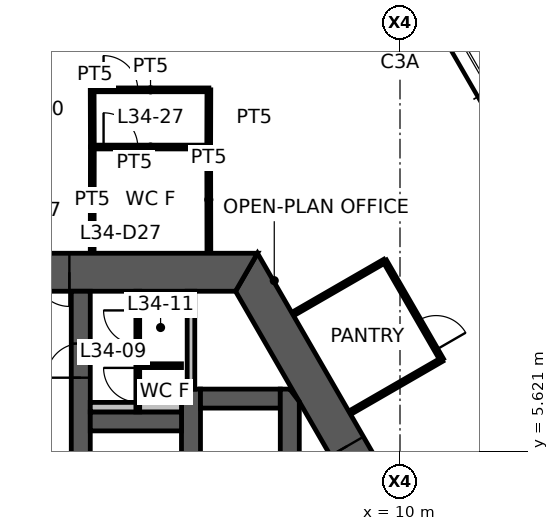
"""IFC4 building model, lengths in metres.
Left out: names, types, materials, properties, quantities, classifications, styles, units other than length and angle.
Written with IfcOpenShell. Run it as: python <this file> out.ifc"""

import sys

from ifc_helpers import new_model, si_unit, direction, frame, frame_2d, origin, place, context, subcontext, project, spatial, polyline, rectangle, outline, extrude, element, fill, save


model = new_model("IFC4")
c1 = context("Model", 3, precision=1e-05, world=origin(), true_north=direction((0.0, 1.0)))
c2 = subcontext(c1, "Body", "Model", "MODEL_VIEW")
j1 = project(units=[si_unit("LENGTHUNIT", "METRE"), si_unit("PLANEANGLEUNIT", "RADIAN")], contexts=[c1])
p1 = place(None, origin())
s1 = spatial("IfcSite", under=j1, at=p1, CompositionType="ELEMENT")
p2 = place(p1, origin())
s2 = spatial("IfcBuilding", under=s1, at=p2, CompositionType="ELEMENT")
p3 = place(p2, frame((0.0, 0.0, 137.0)))
s3 = spatial("IfcBuildingStorey", under=s2, at=p3, CompositionType="ELEMENT", Elevation=137.0)
p4 = place(p3, frame((11.922, 0.0, 0.0), z_axis=(0.0, 0.0, 1.0), x_axis=(-0.500004296715, 0.866022923061, 0.0)))
e1 = element("IfcWall", 1, at=p4, inside=s3, PredefinedType="SHEAR", context=c2, shape_type="SweptSolid", body=[
    extrude(outline(polyline([(-0.289, -0.5), (5.835, -0.5), (6.635, -0.5), (12.211, -0.5), (11.634, 0.5), (6.635, 0.5), (5.835, 0.5), (0.289, 0.5), (-0.289, -0.5)])), origin(), (0.0, 0.0, 1.0), 3.9),
])
p5 = place(p4, frame((5.835, 0.0, 0.0)))
e2 = element("IfcOpeningElement", 2, at=p5, cuts=e1, PredefinedType="OPENING", context=c2, shape_type="SweptSolid", body=[
    extrude(rectangle(XDim=0.8, YDim=2.1, at=frame_2d((0.4, 1.05))), frame((0.0, 0.51, 0.0), z_axis=(0.0, -1.0, 0.0), x_axis=(1.0, 0.0, 0.0)), (0.0, 0.0, 1.0), 1.02),
])
p6 = place(p3, frame((5.961, 10.325, 0.0), z_axis=(0.0, 0.0, 1.0), x_axis=(-1.0, 0.0, 0.0)))
e3 = element("IfcWall", 3, at=p6, inside=s3, PredefinedType="SHEAR", context=c2, shape_type="SweptSolid", body=[
    extrude(outline(polyline([(-0.289, -0.5), (4.661, -0.5), (5.561, -0.5), (6.361, -0.5), (7.261, -0.5), (12.211, -0.5), (11.634, 0.5), (7.261, 0.5), (6.361, 0.5), (5.561, 0.5), (4.661, 0.5), (0.289, 0.5), (-0.289, -0.5)])), origin(), (0.0, 0.0, 1.0), 3.9),
])
p7 = place(p6, frame((6.361, 0.0, 0.0)))
e4 = element("IfcOpeningElement", 4, at=p7, cuts=e3, PredefinedType="OPENING", context=c2, shape_type="SweptSolid", body=[
    extrude(rectangle(XDim=0.9, YDim=2.1, at=frame_2d((0.45, 1.05))), frame((0.0, 0.51, 0.0), z_axis=(0.0, -1.0, 0.0), x_axis=(1.0, 0.0, 0.0)), (0.0, 0.0, 1.0), 1.02),
])
p8 = place(p6, frame((4.661, 0.0, 0.0)))
e5 = element("IfcOpeningElement", 5, at=p8, cuts=e3, PredefinedType="OPENING", context=c2, shape_type="SweptSolid", body=[
    extrude(rectangle(XDim=0.9, YDim=2.1, at=frame_2d((0.45, 1.05))), frame((0.0, 0.51, 0.0), z_axis=(0.0, -1.0, 0.0), x_axis=(1.0, 0.0, 0.0)), (0.0, 0.0, 1.0), 1.02),
])
p9 = place(p3, frame((1.6, 3.85, 0.0), z_axis=(0.0, 0.0, 1.0), x_axis=(0.0, 1.0, 0.0)))
e6 = element("IfcWall", 6, at=p9, inside=s3, PredefinedType="SHEAR", context=c2, shape_type="SweptSolid", body=[
    extrude(rectangle(XDim=5.975, YDim=0.5, at=frame_2d((2.987, 0.0))), origin(), (0.0, 0.0, 1.0), 3.9),
])
p10 = place(p9, frame((3.7, 0.0, 0.0)))
e7 = element("IfcOpeningElement", 7, at=p10, cuts=e6, PredefinedType="OPENING", context=c2, shape_type="SweptSolid", body=[
    extrude(rectangle(XDim=0.9, YDim=2.1, at=frame_2d((0.45, 1.05))), frame((0.0, 0.26, 0.0), z_axis=(0.0, -1.0, 0.0), x_axis=(1.0, 0.0, 0.0)), (0.0, 0.0, 1.0), 0.52),
])
p11 = place(p3, frame((4.5, 3.85, 0.0), z_axis=(0.0, 0.0, 1.0), x_axis=(0.0, 1.0, 0.0)))
e8 = element("IfcWall", 8, at=p11, inside=s3, PredefinedType="SHEAR", context=c2, shape_type="SweptSolid", body=[
    extrude(rectangle(XDim=3.4, YDim=0.5, at=frame_2d((1.7, 0.0))), origin(), (0.0, 0.0, 1.0), 3.9),
])
p12 = place(p3, frame((1.85, 6.4, 0.0), z_axis=(0.0, 0.0, 1.0), x_axis=(1.0, 0.0, 0.0)))
e9 = element("IfcWall", 9, at=p12, inside=s3, PredefinedType="SHEAR", context=c2, shape_type="SweptSolid", body=[
    extrude(rectangle(XDim=2.4, YDim=0.5, at=frame_2d((1.2, 0.0))), origin(), (0.0, 0.0, 1.0), 3.9),
])
p13 = place(p3, frame((4.75, 7.0, 0.0), z_axis=(0.0, 0.0, 1.0), x_axis=(1.0, 0.0, 0.0)))
e10 = element("IfcWall", 10, at=p13, inside=s3, PredefinedType="SHEAR", context=c2, shape_type="SweptSolid", body=[
    extrude(rectangle(XDim=2.1, YDim=0.5, at=frame_2d((1.05, 0.0))), origin(), (0.0, 0.0, 1.0), 3.9),
])
p14 = place(p3, frame((7.1, 3.85, 0.0), z_axis=(0.0, 0.0, 1.0), x_axis=(0.0, 1.0, 0.0)))
e11 = element("IfcWall", 11, at=p14, inside=s3, PredefinedType="SHEAR", context=c2, shape_type="SweptSolid", body=[
    extrude(outline(polyline([(0.0, -0.25), (3.069, -0.25), (3.4, 0.0), (3.4, 0.25), (0.0, 0.25), (0.0, -0.25)])), origin(), (0.0, 0.0, 1.0), 3.9),
])
p15 = place(p3, frame((4.5, 7.25, 0.0), z_axis=(0.0, 0.0, 1.0), x_axis=(0.0, 1.0, 0.0)))
e12 = element("IfcWall", 12, at=p15, inside=s3, PredefinedType="STANDARD", context=c2, shape_type="SweptSolid", body=[
    extrude(rectangle(XDim=2.575, YDim=0.2, at=frame_2d((1.288, 0.0))), origin(), (0.0, 0.0, 1.0), 3.9),
])
p16 = place(p3, frame((1.85, 6.775, 0.0), z_axis=(0.0, 0.0, 1.0), x_axis=(1.0, 0.0, 0.0)))
e13 = element("IfcWall", 13, at=p16, inside=s3, PredefinedType="PLUMBINGWALL", context=c2, shape_type="SweptSolid", body=[
    extrude(rectangle(XDim=2.4, YDim=0.25, at=frame_2d((1.2, 0.0))), origin(), (0.0, 0.0, 1.0), 3.9),
])
p17 = place(p3, frame((3.1, 6.65, 0.0), z_axis=(0.0, 0.0, 1.0), x_axis=(0.0, 1.0, 0.0)))
e14 = element("IfcWall", 14, at=p17, inside=s3, PredefinedType="PARTITIONING", context=c2, shape_type="SweptSolid", body=[
    extrude(rectangle(XDim=3.175, YDim=0.1, at=frame_2d((1.587, 0.0))), origin(), (0.0, 0.0, 1.0), 2.95),
])
p18 = place(p17, frame((0.258, 0.0, 0.0)))
e15 = element("IfcOpeningElement", 15, at=p18, cuts=e14, PredefinedType="OPENING", context=c2, shape_type="SweptSolid", body=[
    extrude(rectangle(XDim=0.9, YDim=2.1, at=frame_2d((0.45, 1.05))), frame((0.0, 0.06, 0.0), z_axis=(0.0, -1.0, 0.0), x_axis=(1.0, 0.0, 0.0)), (0.0, 0.0, 1.0), 0.12),
])
p19 = place(p17, frame((1.771, 0.0, 0.0)))
e16 = element("IfcOpeningElement", 16, at=p19, cuts=e14, PredefinedType="OPENING", context=c2, shape_type="SweptSolid", body=[
    extrude(rectangle(XDim=0.9, YDim=2.1, at=frame_2d((0.45, 1.05))), frame((0.0, 0.06, 0.0), z_axis=(0.0, -1.0, 0.0), x_axis=(1.0, 0.0, 0.0)), (0.0, 0.0, 1.0), 0.12),
])
p20 = place(p3, frame((3.15, 7.866, 0.0), z_axis=(0.0, 0.0, 1.0), x_axis=(1.0, 0.0, 0.0)))
e17 = element("IfcWall", 17, at=p20, inside=s3, PredefinedType="PARTITIONING", context=c2, shape_type="SweptSolid", body=[
    extrude(rectangle(XDim=1.1, YDim=0.1, at=frame_2d((0.55, 0.0))), origin(), (0.0, 0.0, 1.0), 2.95),
])
p21 = place(p3, frame((1.9, 13.62, 0.0), z_axis=(0.0, 0.0, 1.0), x_axis=(1.0, 0.0, 0.0)))
e18 = element("IfcWall", 18, at=p21, inside=s3, PredefinedType="PARTITIONING", context=c2, shape_type="SweptSolid", body=[
    extrude(rectangle(XDim=3.071, YDim=0.1, at=frame_2d((1.536, 0.0))), origin(), (0.0, 0.0, 1.0), 2.95),
])
p22 = place(p21, frame((0.3, 0.0, 0.0)))
e19 = element("IfcOpeningElement", 19, at=p22, cuts=e18, PredefinedType="OPENING", context=c2, shape_type="SweptSolid", body=[
    extrude(rectangle(XDim=0.9, YDim=2.1, at=frame_2d((0.45, 1.05))), frame((0.0, 0.06, 0.0), z_axis=(0.0, -1.0, 0.0), x_axis=(1.0, 0.0, 0.0)), (0.0, 0.0, 1.0), 0.12),
])
for number, where, z_axis, x_axis in (
    (20, (1.9, 10.845, 0.0), (0.0, 0.0, 1.0), (0.002, 1.0, 0.0)),
    (21, (4.966, 13.625, 0.0), (0.0, 0.0, 1.0), (0.002, -1.0, 0.0)),
):
    element("IfcWall", number, at=place(p3, frame(where, z_axis=z_axis, x_axis=x_axis)), inside=s3, PredefinedType="PARTITIONING", context=c2, shape_type="SweptSolid", body=[
        extrude(rectangle(XDim=2.78, YDim=0.1, at=frame_2d((1.39, 0.0))), origin(), (0.0, 0.0, 1.0), 2.95),
    ])
p23 = place(p3, frame((1.9, 15.125, 0.0), z_axis=(0.0, 0.0, 1.0), x_axis=(1.0, 0.0, 0.0)))
e22 = element("IfcWall", 22, at=p23, inside=s3, PredefinedType="PARTITIONING", context=c2, shape_type="SweptSolid", body=[
    extrude(rectangle(XDim=3.071, YDim=0.1, at=frame_2d((1.536, 0.0))), origin(), (0.0, 0.0, 1.0), 2.95),
])
p24 = place(p23, frame((0.3, 0.0, 0.0)))
e23 = element("IfcOpeningElement", 23, at=p24, cuts=e22, PredefinedType="OPENING", context=c2, shape_type="SweptSolid", body=[
    extrude(rectangle(XDim=0.9, YDim=2.1, at=frame_2d((0.45, 1.05))), frame((0.0, 0.06, 0.0), z_axis=(0.0, -1.0, 0.0), x_axis=(1.0, 0.0, 0.0)), (0.0, 0.0, 1.0), 0.12),
])
for number, where, z_axis, x_axis in (
    (24, (1.905, 13.625, 0.0), (0.0, 0.0, 1.0), (-0.003, 1.0, 0.0)),
    (25, (4.971, 15.125, 0.0), (0.0, 0.0, 1.0), (-0.003, -1.0, 0.0)),
):
    element("IfcWall", number, at=place(p3, frame(where, z_axis=z_axis, x_axis=x_axis)), inside=s3, PredefinedType="PARTITIONING", context=c2, shape_type="SweptSolid", body=[
        extrude(rectangle(XDim=1.5, YDim=0.1, at=frame_2d((0.75, 0.0))), origin(), (0.0, 0.0, 1.0), 2.95),
    ])
p25 = place(p3, frame((7.192, 9.233, 0.0), z_axis=(0.0, 0.0, 1.0), x_axis=(0.866018876994, 0.500011304563, 0.0)))
e26 = element("IfcWall", 26, at=p25, inside=s3, PredefinedType="PARTITIONING", context=c2, shape_type="SweptSolid", body=[
    extrude(rectangle(XDim=2.78, YDim=0.1, at=frame_2d((1.39, 0.0))), origin(), (0.0, 0.0, 1.0), 2.95),
])
p26 = place(p3, frame((9.6, 10.623, 0.0), z_axis=(0.0, 0.0, 1.0), x_axis=(0.499990139034, -0.866031096941, 0.0)))
e27 = element("IfcWall", 27, at=p26, inside=s3, PredefinedType="PARTITIONING", context=c2, shape_type="SweptSolid", body=[
    extrude(rectangle(XDim=3.0, YDim=0.1, at=frame_2d((1.5, 0.0))), origin(), (0.0, 0.0, 1.0), 2.95),
])
p27 = place(p26, frame((1.8, 0.0, 0.0)))
e28 = element("IfcOpeningElement", 28, at=p27, cuts=e27, PredefinedType="OPENING", context=c2, shape_type="SweptSolid", body=[
    extrude(rectangle(XDim=0.9, YDim=2.1, at=frame_2d((0.45, 1.05))), frame((0.0, 0.06, 0.0), z_axis=(0.0, -1.0, 0.0), x_axis=(1.0, 0.0, 0.0)), (0.0, 0.0, 1.0), 0.12),
])
p28 = place(p3, frame((11.1, 8.025, 0.0), z_axis=(0.0, 0.0, 1.0), x_axis=(-0.866056901187, -0.49994544093, 0.0)))
e29 = element("IfcWall", 29, at=p28, inside=s3, PredefinedType="PARTITIONING", context=c2, shape_type="SweptSolid", body=[
    extrude(rectangle(XDim=2.78, YDim=0.1, at=frame_2d((1.39, 0.0))), origin(), (0.0, 0.0, 1.0), 2.95),
])
p29 = place(p8, origin())
e30 = element("IfcDoor", 30, at=p29, inside=s3, OperationType="SINGLE_SWING_LEFT", PredefinedType="DOOR", context=c2, shape_type="SweptSolid", body=[
    extrude(rectangle(XDim=0.9, YDim=2.1, at=frame_2d((0.45, 1.05))), frame((0.0, 0.025, 0.0), z_axis=(0.0, -1.0, 0.0), x_axis=(1.0, 0.0, 0.0)), (0.0, 0.0, 1.0), 0.05),
])
fill(e5, e30)
p30 = place(p5, origin())
e31 = element("IfcDoor", 31, at=p30, inside=s3, OperationType="SINGLE_SWING_RIGHT", PredefinedType="DOOR", context=c2, shape_type="SweptSolid", body=[
    extrude(rectangle(XDim=0.8, YDim=2.1, at=frame_2d((0.4, 1.05))), frame((0.0, 0.025, 0.0), z_axis=(0.0, -1.0, 0.0), x_axis=(1.0, 0.0, 0.0)), (0.0, 0.0, 1.0), 0.05),
])
fill(e2, e31)
p31 = place(p10, origin())
e32 = element("IfcDoor", 32, at=p31, inside=s3, OperationType="SINGLE_SWING_LEFT", PredefinedType="DOOR", context=c2, shape_type="SweptSolid", body=[
    extrude(rectangle(XDim=0.9, YDim=2.1, at=frame_2d((0.45, 1.05))), frame((0.0, 0.025, 0.0), z_axis=(0.0, -1.0, 0.0), x_axis=(1.0, 0.0, 0.0)), (0.0, 0.0, 1.0), 0.05),
])
fill(e7, e32)
p32 = place(p18, origin())
e33 = element("IfcDoor", 33, at=p32, inside=s3, OperationType="SINGLE_SWING_RIGHT", PredefinedType="DOOR", context=c2, shape_type="SweptSolid", body=[
    extrude(rectangle(XDim=0.9, YDim=2.1, at=frame_2d((0.45, 1.05))), frame((0.0, 0.025, 0.0), z_axis=(0.0, -1.0, 0.0), x_axis=(1.0, 0.0, 0.0)), (0.0, 0.0, 1.0), 0.05),
])
fill(e15, e33)
p33 = place(p19, origin())
e34 = element("IfcDoor", 34, at=p33, inside=s3, OperationType="SINGLE_SWING_RIGHT", PredefinedType="DOOR", context=c2, shape_type="SweptSolid", body=[
    extrude(rectangle(XDim=0.9, YDim=2.1, at=frame_2d((0.45, 1.05))), frame((0.0, 0.025, 0.0), z_axis=(0.0, -1.0, 0.0), x_axis=(1.0, 0.0, 0.0)), (0.0, 0.0, 1.0), 0.05),
])
fill(e16, e34)
p34 = place(p22, origin())
e35 = element("IfcDoor", 35, at=p34, inside=s3, OperationType="SINGLE_SWING_LEFT", PredefinedType="DOOR", context=c2, shape_type="SweptSolid", body=[
    extrude(rectangle(XDim=0.9, YDim=2.1, at=frame_2d((0.45, 1.05))), frame((0.0, 0.025, 0.0), z_axis=(0.0, -1.0, 0.0), x_axis=(1.0, 0.0, 0.0)), (0.0, 0.0, 1.0), 0.05),
])
fill(e19, e35)
p35 = place(p24, origin())
e36 = element("IfcDoor", 36, at=p35, inside=s3, OperationType="SINGLE_SWING_LEFT", PredefinedType="DOOR", context=c2, shape_type="SweptSolid", body=[
    extrude(rectangle(XDim=0.9, YDim=2.1, at=frame_2d((0.45, 1.05))), frame((0.0, 0.025, 0.0), z_axis=(0.0, -1.0, 0.0), x_axis=(1.0, 0.0, 0.0)), (0.0, 0.0, 1.0), 0.05),
])
fill(e23, e36)
p36 = place(p27, origin())
e37 = element("IfcDoor", 37, at=p36, inside=s3, OperationType="SINGLE_SWING_RIGHT", PredefinedType="DOOR", context=c2, shape_type="SweptSolid", body=[
    extrude(rectangle(XDim=0.9, YDim=2.1, at=frame_2d((0.45, 1.05))), frame((0.0, 0.025, 0.0), z_axis=(0.0, -1.0, 0.0), x_axis=(1.0, 0.0, 0.0)), (0.0, 0.0, 1.0), 0.05),
])
fill(e28, e37)
save(model, sys.argv[1])
